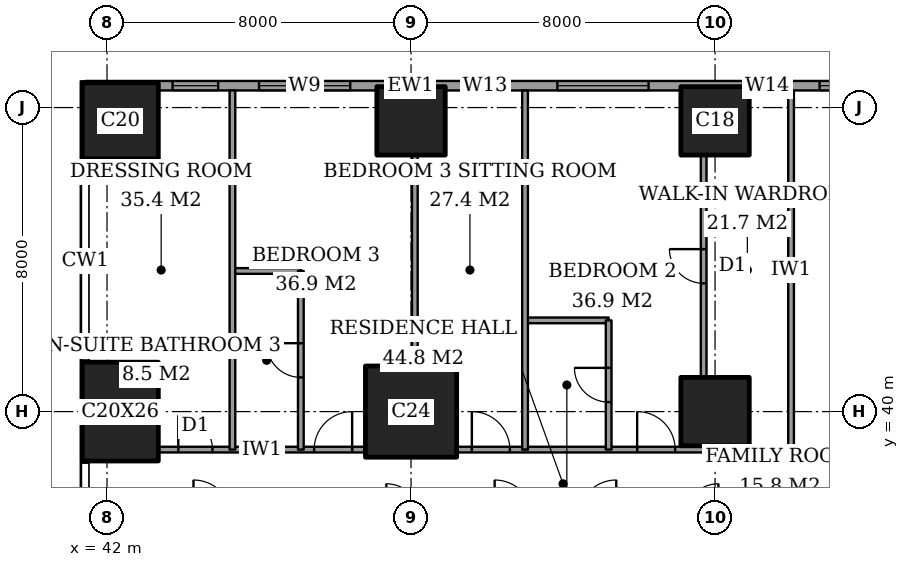
"""IFC4 building model, lengths in metres.
Left out: names, types, materials, properties, quantities, classifications, styles, units other than length and angle.
Written with IfcOpenShell. Run it as: python <this file> out.ifc"""

import sys

from ifc_helpers import new_model, si_unit, direction, frame, frame_2d, origin, origin_2d, place, context, subcontext, project, spatial, rectangle, extrude, element, fill, save


model = new_model("IFC4")
c1 = context("Model", 3, precision=1e-05, world=origin(), true_north=direction((0.0, 1.0)))
c2 = subcontext(c1, "Body", "Model", "MODEL_VIEW")
j1 = project(units=[si_unit("LENGTHUNIT", "METRE"), si_unit("PLANEANGLEUNIT", "RADIAN")], contexts=[c1])
p1 = place(None, origin())
s1 = spatial("IfcSite", under=j1, at=p1, CompositionType="ELEMENT")
p2 = place(p1, origin())
s2 = spatial("IfcBuilding", under=s1, at=p2, CompositionType="ELEMENT")
p3 = place(p2, frame((0.0, 0.0, 207.4)))
s3 = spatial("IfcBuildingStorey", under=s2, at=p3, CompositionType="ELEMENT", Elevation=207.4)
p4 = place(p3, frame((42.35, 40.0, 0.0), z_axis=(0.0, 0.0, 1.0), x_axis=(1.0, 0.0, 0.0)))
e1 = element("IfcColumn", 1, at=p4, inside=s3, PredefinedType="COLUMN", context=c2, shape_type="SweptSolid", body=[
    extrude(rectangle(XDim=2.0, YDim=2.6, at=origin_2d()), origin(), (0.0, 0.0, 1.0), 3.6),
])
p5 = place(p3, frame((42.35, 47.65, 0.0), z_axis=(0.0, 0.0, 1.0), x_axis=(1.0, 0.0, 0.0)))
e2 = element("IfcColumn", 2, at=p5, inside=s3, PredefinedType="COLUMN", context=c2, shape_type="SweptSolid", body=[
    extrude(rectangle(XDim=2.0, YDim=2.0, at=origin_2d()), origin(), (0.0, 0.0, 1.0), 3.6),
])
p6 = place(p3, frame((50.0, 40.0, 0.0), z_axis=(0.0, 0.0, 1.0), x_axis=(1.0, 0.0, 0.0)))
e3 = element("IfcColumn", 3, at=p6, inside=s3, PredefinedType="COLUMN", context=c2, shape_type="SweptSolid", body=[
    extrude(rectangle(XDim=2.4, YDim=2.4, at=origin_2d()), origin(), (0.0, 0.0, 1.0), 3.6),
])
for number, where, z_axis, x_axis in (
    (4, (50.0, 47.65, 0.0), (0.0, 0.0, 1.0), (1.0, 0.0, 0.0)),
    (5, (58.0, 40.0, 0.0), (0.0, 0.0, 1.0), (1.0, 0.0, 0.0)),
    (6, (58.0, 47.65, 0.0), (0.0, 0.0, 1.0), (1.0, 0.0, 0.0)),
):
    element("IfcColumn", number, at=place(p3, frame(where, z_axis=z_axis, x_axis=x_axis)), inside=s3, PredefinedType="COLUMN", context=c2, shape_type="SweptSolid", body=[
        extrude(rectangle(XDim=1.8, YDim=1.8, at=origin_2d()), origin(), (0.0, 0.0, 1.0), 3.6),
    ])
p7 = place(p3, frame((62.825, 48.575, 0.0), z_axis=(0.0, 0.0, 1.0), x_axis=(-1.0, 0.0, 0.0)))
e7 = element("IfcWall", 7, at=p7, inside=s3, PredefinedType="SOLIDWALL", context=c2, shape_type="SweptSolid", body=[
    extrude(rectangle(XDim=21.4, YDim=0.25, at=frame_2d((10.7, 0.0))), origin(), (0.0, 0.0, 1.0), 3.6),
])
p8 = place(p7, frame((0.875, 0.0, 0.2)))
e8 = element("IfcOpeningElement", 8, at=p8, cuts=e7, PredefinedType="OPENING", context=c2, shape_type="SweptSolid", body=[
    extrude(rectangle(XDim=1.2, YDim=2.4, at=frame_2d((0.6, 1.2))), frame((0.0, 0.135, 0.0), z_axis=(0.0, -1.0, 0.0), x_axis=(1.0, 0.0, 0.0)), (0.0, 0.0, 1.0), 0.27),
])
p9 = place(p7, frame((3.15, 0.0, 0.2)))
e9 = element("IfcOpeningElement", 9, at=p9, cuts=e7, PredefinedType="OPENING", context=c2, shape_type="SweptSolid", body=[
    extrude(rectangle(XDim=0.6, YDim=2.4, at=frame_2d((0.3, 1.2))), frame((0.0, 0.135, 0.0), z_axis=(0.0, -1.0, 0.0), x_axis=(1.0, 0.0, 0.0)), (0.0, 0.0, 1.0), 0.27),
])
p10 = place(p7, frame((6.575, 0.0, 0.2)))
e10 = element("IfcOpeningElement", 10, at=p10, cuts=e7, PredefinedType="OPENING", context=c2, shape_type="SweptSolid", body=[
    extrude(rectangle(XDim=2.4, YDim=2.4, at=frame_2d((1.2, 1.2))), frame((0.0, 0.135, 0.0), z_axis=(0.0, -1.0, 0.0), x_axis=(1.0, 0.0, 0.0)), (0.0, 0.0, 1.0), 0.27),
])
p11 = place(p7, frame((10.275, 0.0, 0.2)))
e11 = element("IfcOpeningElement", 11, at=p11, cuts=e7, PredefinedType="OPENING", context=c2, shape_type="SweptSolid", body=[
    extrude(rectangle(XDim=1.2, YDim=2.4, at=frame_2d((0.6, 1.2))), frame((0.0, 0.135, 0.0), z_axis=(0.0, -1.0, 0.0), x_axis=(1.0, 0.0, 0.0)), (0.0, 0.0, 1.0), 0.27),
])
p12 = place(p7, frame((14.425, 0.0, 0.2)))
e12 = element("IfcOpeningElement", 12, at=p12, cuts=e7, PredefinedType="OPENING", context=c2, shape_type="SweptSolid", body=[
    extrude(rectangle(XDim=2.4, YDim=2.4, at=frame_2d((1.2, 1.2))), frame((0.0, 0.135, 0.0), z_axis=(0.0, -1.0, 0.0), x_axis=(1.0, 0.0, 0.0)), (0.0, 0.0, 1.0), 0.27),
])
p13 = place(p7, frame((17.9, 0.0, 0.2)))
e13 = element("IfcOpeningElement", 13, at=p13, cuts=e7, PredefinedType="OPENING", context=c2, shape_type="SweptSolid", body=[
    extrude(rectangle(XDim=1.2, YDim=2.4, at=frame_2d((0.6, 1.2))), frame((0.0, 0.135, 0.0), z_axis=(0.0, -1.0, 0.0), x_axis=(1.0, 0.0, 0.0)), (0.0, 0.0, 1.0), 0.27),
])
p14 = place(p3, frame((43.35, 39.0, 0.0), z_axis=(0.0, 0.0, 1.0), x_axis=(1.0, 0.0, 0.0)))
e14 = element("IfcWall", 14, at=p14, inside=s3, PredefinedType="PARTITIONING", context=c2, shape_type="SweptSolid", body=[
    extrude(rectangle(XDim=5.45, YDim=0.15, at=frame_2d((2.725, 0.0))), origin(), (0.0, 0.0, 1.0), 3.35),
])
p15 = place(p14, frame((4.1, 0.0, 0.0)))
e15 = element("IfcOpeningElement", 15, at=p15, cuts=e14, PredefinedType="OPENING", context=c2, shape_type="SweptSolid", body=[
    extrude(rectangle(XDim=1.0, YDim=2.1, at=frame_2d((0.5, 1.05))), frame((0.0, 0.085, 0.0), z_axis=(0.0, -1.0, 0.0), x_axis=(1.0, 0.0, 0.0)), (0.0, 0.0, 1.0), 0.17),
])
p16 = place(p14, frame((0.525, 0.0, 0.0)))
e16 = element("IfcOpeningElement", 16, at=p16, cuts=e14, PredefinedType="OPENING", context=c2, shape_type="SweptSolid", body=[
    extrude(rectangle(XDim=0.9, YDim=2.1, at=frame_2d((0.45, 1.05))), frame((0.0, 0.085, 0.0), z_axis=(0.0, -1.0, 0.0), x_axis=(1.0, 0.0, 0.0)), (0.0, 0.0, 1.0), 0.17),
])
p17 = place(p3, frame((51.2, 39.0, 0.0), z_axis=(0.0, 0.0, 1.0), x_axis=(1.0, 0.0, 0.0)))
e17 = element("IfcWall", 17, at=p17, inside=s3, PredefinedType="PARTITIONING", context=c2, shape_type="SweptSolid", body=[
    extrude(rectangle(XDim=15.25, YDim=0.15, at=frame_2d((7.625, 0.0))), origin(), (0.0, 0.0, 1.0), 3.35),
])
p18 = place(p17, frame((11.525, 0.0, 0.0)))
e18 = element("IfcOpeningElement", 18, at=p18, cuts=e17, PredefinedType="OPENING", context=c2, shape_type="SweptSolid", body=[
    extrude(rectangle(XDim=1.0, YDim=2.1, at=frame_2d((0.5, 1.05))), frame((0.0, 0.085, 0.0), z_axis=(0.0, -1.0, 0.0), x_axis=(1.0, 0.0, 0.0)), (0.0, 0.0, 1.0), 0.17),
])
p19 = place(p17, frame((4.75, 0.0, 0.0)))
e19 = element("IfcOpeningElement", 19, at=p19, cuts=e17, PredefinedType="OPENING", context=c2, shape_type="SweptSolid", body=[
    extrude(rectangle(XDim=1.0, YDim=2.1, at=frame_2d((0.5, 1.05))), frame((0.0, 0.085, 0.0), z_axis=(0.0, -1.0, 0.0), x_axis=(1.0, 0.0, 0.0)), (0.0, 0.0, 1.0), 0.17),
])
p20 = place(p17, frame((0.4, 0.0, 0.0)))
e20 = element("IfcOpeningElement", 20, at=p20, cuts=e17, PredefinedType="OPENING", context=c2, shape_type="SweptSolid", body=[
    extrude(rectangle(XDim=1.0, YDim=2.1, at=frame_2d((0.5, 1.05))), frame((0.0, 0.085, 0.0), z_axis=(0.0, -1.0, 0.0), x_axis=(1.0, 0.0, 0.0)), (0.0, 0.0, 1.0), 0.17),
])
p21 = place(p3, frame((53.0, 42.4, 0.0), z_axis=(0.0, 0.0, 1.0), x_axis=(1.0, 0.0, 0.0)))
e21 = element("IfcWall", 21, at=p21, inside=s3, PredefinedType="PARTITIONING", context=c2, shape_type="SweptSolid", body=[
    extrude(rectangle(XDim=2.2, YDim=0.15, at=frame_2d((1.1, 0.0))), origin(), (0.0, 0.0, 1.0), 3.35),
])
p22 = place(p3, frame((45.3, 43.7, 0.0), z_axis=(0.0, 0.0, 1.0), x_axis=(1.0, 0.0, 0.0)))
e22 = element("IfcWall", 22, at=p22, inside=s3, PredefinedType="PARTITIONING", context=c2, shape_type="SweptSolid", body=[
    extrude(rectangle(XDim=1.8, YDim=0.15, at=frame_2d((0.9, 0.0))), origin(), (0.0, 0.0, 1.0), 3.35),
])
p23 = place(p3, frame((45.3, 39.0, 0.0), z_axis=(0.0, 0.0, 1.0), x_axis=(0.0, 1.0, 0.0)))
e23 = element("IfcWall", 23, at=p23, inside=s3, PredefinedType="PARTITIONING", context=c2, shape_type="SweptSolid", body=[
    extrude(rectangle(XDim=9.45, YDim=0.15, at=frame_2d((4.725, 0.0))), origin(), (0.0, 0.0, 1.0), 3.35),
])
p24 = place(p3, frame((47.1, 39.0, 0.0), z_axis=(0.0, 0.0, 1.0), x_axis=(0.0, 1.0, 0.0)))
e24 = element("IfcWall", 24, at=p24, inside=s3, PredefinedType="PARTITIONING", context=c2, shape_type="SweptSolid", body=[
    extrude(rectangle(XDim=4.7, YDim=0.15, at=frame_2d((2.35, 0.0))), origin(), (0.0, 0.0, 1.0), 3.35),
])
p25 = place(p24, frame((1.9, 0.0, 0.0)))
e25 = element("IfcOpeningElement", 25, at=p25, cuts=e24, PredefinedType="OPENING", context=c2, shape_type="SweptSolid", body=[
    extrude(rectangle(XDim=0.9, YDim=2.1, at=frame_2d((0.45, 1.05))), frame((0.0, 0.085, 0.0), z_axis=(0.0, -1.0, 0.0), x_axis=(1.0, 0.0, 0.0)), (0.0, 0.0, 1.0), 0.17),
])
p26 = place(p3, frame((50.1, 41.2, 0.0), z_axis=(0.0, 0.0, 1.0), x_axis=(0.0, 1.0, 0.0)))
e26 = element("IfcWall", 26, at=p26, inside=s3, PredefinedType="PARTITIONING", context=c2, shape_type="SweptSolid", body=[
    extrude(rectangle(XDim=5.55, YDim=0.15, at=frame_2d((2.775, 0.0))), origin(), (0.0, 0.0, 1.0), 3.35),
])
p27 = place(p3, frame((53.0, 39.0, 0.0), z_axis=(0.0, 0.0, 1.0), x_axis=(0.0, 1.0, 0.0)))
e27 = element("IfcWall", 27, at=p27, inside=s3, PredefinedType="PARTITIONING", context=c2, shape_type="SweptSolid", body=[
    extrude(rectangle(XDim=9.45, YDim=0.15, at=frame_2d((4.725, 0.0))), origin(), (0.0, 0.0, 1.0), 3.35),
])
p28 = place(p3, frame((55.2, 39.0, 0.0), z_axis=(0.0, 0.0, 1.0), x_axis=(0.0, 1.0, 0.0)))
e28 = element("IfcWall", 28, at=p28, inside=s3, PredefinedType="PARTITIONING", context=c2, shape_type="SweptSolid", body=[
    extrude(rectangle(XDim=3.4, YDim=0.15, at=frame_2d((1.7, 0.0))), origin(), (0.0, 0.0, 1.0), 3.35),
])
p29 = place(p28, frame((1.25, 0.0, 0.0)))
e29 = element("IfcOpeningElement", 29, at=p29, cuts=e28, PredefinedType="OPENING", context=c2, shape_type="SweptSolid", body=[
    extrude(rectangle(XDim=0.9, YDim=2.1, at=frame_2d((0.45, 1.05))), frame((0.0, 0.085, 0.0), z_axis=(0.0, -1.0, 0.0), x_axis=(1.0, 0.0, 0.0)), (0.0, 0.0, 1.0), 0.17),
])
p30 = place(p3, frame((57.7, 40.9, 0.0), z_axis=(0.0, 0.0, 1.0), x_axis=(0.0, 1.0, 0.0)))
e30 = element("IfcWall", 30, at=p30, inside=s3, PredefinedType="PARTITIONING", context=c2, shape_type="SweptSolid", body=[
    extrude(rectangle(XDim=5.85, YDim=0.15, at=frame_2d((2.925, 0.0))), origin(), (0.0, 0.0, 1.0), 3.35),
])
p31 = place(p30, frame((2.475, 0.0, 0.0)))
e31 = element("IfcOpeningElement", 31, at=p31, cuts=e30, PredefinedType="OPENING", context=c2, shape_type="SweptSolid", body=[
    extrude(rectangle(XDim=0.9, YDim=2.1, at=frame_2d((0.45, 1.05))), frame((0.0, 0.085, 0.0), z_axis=(0.0, -1.0, 0.0), x_axis=(1.0, 0.0, 0.0)), (0.0, 0.0, 1.0), 0.17),
])
p32 = place(p3, frame((60.0, 39.0, 0.0), z_axis=(0.0, 0.0, 1.0), x_axis=(0.0, 1.0, 0.0)))
e32 = element("IfcWall", 32, at=p32, inside=s3, PredefinedType="PARTITIONING", context=c2, shape_type="SweptSolid", body=[
    extrude(rectangle(XDim=9.45, YDim=0.15, at=frame_2d((4.725, 0.0))), origin(), (0.0, 0.0, 1.0), 3.35),
])
p33 = place(p8, origin())
e33 = element("IfcWindow", 33, at=p33, inside=s3, PartitioningType="SINGLE_PANEL", PredefinedType="WINDOW", context=c2, shape_type="SweptSolid", body=[
    extrude(rectangle(XDim=1.2, YDim=2.4, at=frame_2d((0.6, 1.2))), frame((0.0, 0.03, 0.0), z_axis=(0.0, -1.0, 0.0), x_axis=(1.0, 0.0, 0.0)), (0.0, 0.0, 1.0), 0.06),
])
fill(e8, e33)
p34 = place(p9, origin())
e34 = element("IfcWindow", 34, at=p34, inside=s3, PartitioningType="SINGLE_PANEL", PredefinedType="WINDOW", context=c2, shape_type="SweptSolid", body=[
    extrude(rectangle(XDim=0.6, YDim=2.4, at=frame_2d((0.3, 1.2))), frame((0.0, 0.03, 0.0), z_axis=(0.0, -1.0, 0.0), x_axis=(1.0, 0.0, 0.0)), (0.0, 0.0, 1.0), 0.06),
])
fill(e9, e34)
p35 = place(p10, origin())
e35 = element("IfcWindow", 35, at=p35, inside=s3, PartitioningType="SINGLE_PANEL", PredefinedType="WINDOW", context=c2, shape_type="SweptSolid", body=[
    extrude(rectangle(XDim=2.4, YDim=2.4, at=frame_2d((1.2, 1.2))), frame((0.0, 0.03, 0.0), z_axis=(0.0, -1.0, 0.0), x_axis=(1.0, 0.0, 0.0)), (0.0, 0.0, 1.0), 0.06),
])
fill(e10, e35)
p36 = place(p11, origin())
e36 = element("IfcWindow", 36, at=p36, inside=s3, PartitioningType="SINGLE_PANEL", PredefinedType="WINDOW", context=c2, shape_type="SweptSolid", body=[
    extrude(rectangle(XDim=1.2, YDim=2.4, at=frame_2d((0.6, 1.2))), frame((0.0, 0.03, 0.0), z_axis=(0.0, -1.0, 0.0), x_axis=(1.0, 0.0, 0.0)), (0.0, 0.0, 1.0), 0.06),
])
fill(e11, e36)
p37 = place(p12, origin())
e37 = element("IfcWindow", 37, at=p37, inside=s3, PartitioningType="SINGLE_PANEL", PredefinedType="WINDOW", context=c2, shape_type="SweptSolid", body=[
    extrude(rectangle(XDim=2.4, YDim=2.4, at=frame_2d((1.2, 1.2))), frame((0.0, 0.03, 0.0), z_axis=(0.0, -1.0, 0.0), x_axis=(1.0, 0.0, 0.0)), (0.0, 0.0, 1.0), 0.06),
])
fill(e12, e37)
p38 = place(p13, origin())
e38 = element("IfcWindow", 38, at=p38, inside=s3, PartitioningType="SINGLE_PANEL", PredefinedType="WINDOW", context=c2, shape_type="SweptSolid", body=[
    extrude(rectangle(XDim=1.2, YDim=2.4, at=frame_2d((0.6, 1.2))), frame((0.0, 0.03, 0.0), z_axis=(0.0, -1.0, 0.0), x_axis=(1.0, 0.0, 0.0)), (0.0, 0.0, 1.0), 0.06),
])
fill(e13, e38)
p39 = place(p31, origin())
e39 = element("IfcDoor", 39, at=p39, inside=s3, OperationType="SINGLE_SWING_LEFT", PredefinedType="DOOR", context=c2, shape_type="SweptSolid", body=[
    extrude(rectangle(XDim=0.9, YDim=2.1, at=frame_2d((0.45, 1.05))), frame((0.0, 0.025, 0.0), z_axis=(0.0, -1.0, 0.0), x_axis=(1.0, 0.0, 0.0)), (0.0, 0.0, 1.0), 0.05),
])
fill(e31, e39)
p40 = place(p29, origin())
e40 = element("IfcDoor", 40, at=p40, inside=s3, OperationType="SINGLE_SWING_LEFT", PredefinedType="DOOR", context=c2, shape_type="SweptSolid", body=[
    extrude(rectangle(XDim=0.9, YDim=2.1, at=frame_2d((0.45, 1.05))), frame((0.0, 0.025, 0.0), z_axis=(0.0, -1.0, 0.0), x_axis=(1.0, 0.0, 0.0)), (0.0, 0.0, 1.0), 0.05),
])
fill(e29, e40)
p41 = place(p19, origin())
e41 = element("IfcDoor", 41, at=p41, inside=s3, OperationType="SINGLE_SWING_RIGHT", PredefinedType="DOOR", context=c2, shape_type="SweptSolid", body=[
    extrude(rectangle(XDim=1.0, YDim=2.1, at=frame_2d((0.5, 1.05))), frame((0.0, 0.025, 0.0), z_axis=(0.0, -1.0, 0.0), x_axis=(1.0, 0.0, 0.0)), (0.0, 0.0, 1.0), 0.05),
])
fill(e19, e41)
p42 = place(p20, origin())
e42 = element("IfcDoor", 42, at=p42, inside=s3, OperationType="SINGLE_SWING_RIGHT", PredefinedType="DOOR", context=c2, shape_type="SweptSolid", body=[
    extrude(rectangle(XDim=1.0, YDim=2.1, at=frame_2d((0.5, 1.05))), frame((0.0, 0.025, 0.0), z_axis=(0.0, -1.0, 0.0), x_axis=(1.0, 0.0, 0.0)), (0.0, 0.0, 1.0), 0.05),
])
fill(e20, e42)
p43 = place(p25, origin())
e43 = element("IfcDoor", 43, at=p43, inside=s3, OperationType="SINGLE_SWING_LEFT", PredefinedType="DOOR", context=c2, shape_type="SweptSolid", body=[
    extrude(rectangle(XDim=0.9, YDim=2.1, at=frame_2d((0.45, 1.05))), frame((0.0, 0.025, 0.0), z_axis=(0.0, -1.0, 0.0), x_axis=(1.0, 0.0, 0.0)), (0.0, 0.0, 1.0), 0.05),
])
fill(e25, e43)
p44 = place(p15, origin())
e44 = element("IfcDoor", 44, at=p44, inside=s3, OperationType="SINGLE_SWING_LEFT", PredefinedType="DOOR", context=c2, shape_type="SweptSolid", body=[
    extrude(rectangle(XDim=1.0, YDim=2.1, at=frame_2d((0.5, 1.05))), frame((0.0, 0.025, 0.0), z_axis=(0.0, -1.0, 0.0), x_axis=(1.0, 0.0, 0.0)), (0.0, 0.0, 1.0), 0.05),
])
fill(e15, e44)
p45 = place(p16, origin())
e45 = element("IfcDoor", 45, at=p45, inside=s3, OperationType="SINGLE_SWING_RIGHT", PredefinedType="DOOR", context=c2, shape_type="SweptSolid", body=[
    extrude(rectangle(XDim=0.9, YDim=2.1, at=frame_2d((0.45, 1.05))), frame((0.0, 0.025, 0.0), z_axis=(0.0, -1.0, 0.0), x_axis=(1.0, 0.0, 0.0)), (0.0, 0.0, 1.0), 0.05),
])
fill(e16, e45)
save(model, sys.argv[1])
